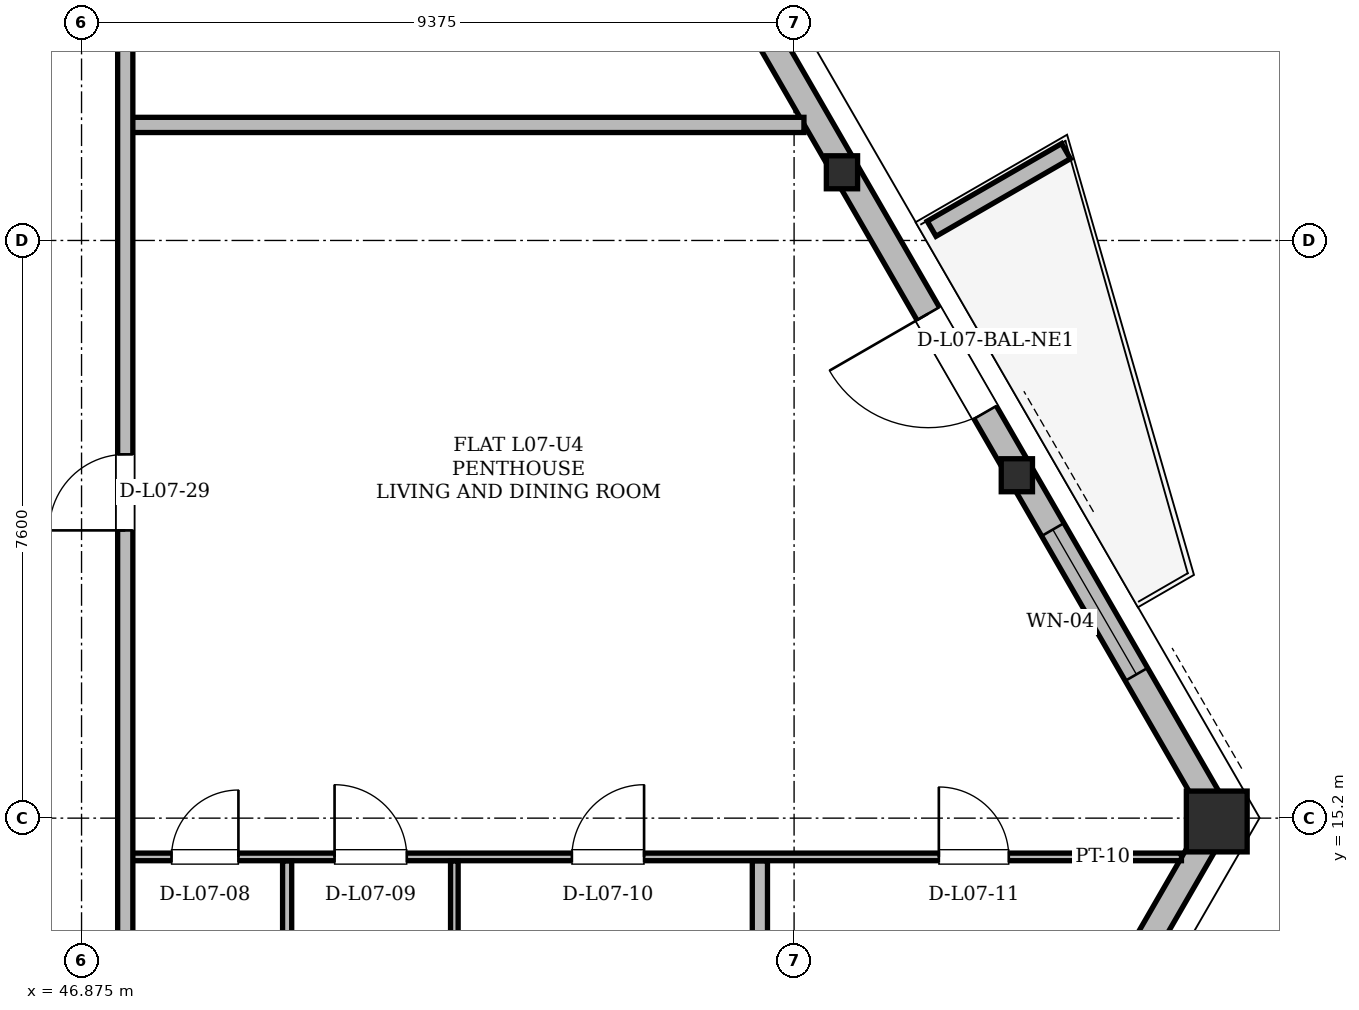
"""IFC4 building model, lengths in metres.
Left out: names, types, materials, properties, quantities, classifications, styles, units other than length and angle.
Written with IfcOpenShell. Run it as: python <this file> out.ifc"""

import sys

from ifc_helpers import new_model, si_unit, direction, frame, frame_2d, origin, origin_2d, place, context, subcontext, project, spatial, polyline, rectangle, hollow_rectangle, i_section, outline, extrude, element, fill, save


model = new_model("IFC4")
c1 = context("Model", 3, precision=1e-05, world=origin(), true_north=direction((0.0, 1.0)))
c2 = subcontext(c1, "Body", "Model", "MODEL_VIEW")
j1 = project(units=[si_unit("LENGTHUNIT", "METRE"), si_unit("PLANEANGLEUNIT", "RADIAN")], contexts=[c1])
p1 = place(None, origin())
s1 = spatial("IfcSite", under=j1, at=p1, CompositionType="ELEMENT")
p2 = place(p1, origin())
s2 = spatial("IfcBuilding", under=s1, at=p2, CompositionType="ELEMENT")
p3 = place(p2, frame((0.0, 0.0, 30.9)))
s3 = spatial("IfcBuildingStorey", under=s2, at=p3, CompositionType="ELEMENT", Elevation=30.9)
p4 = place(p3, frame((61.844, 15.204, 0.005), z_axis=(-0.018346571143, -0.026500602762, 0.999480425712), x_axis=(0.822192191644, -0.56920997883, 0.0)))
e1 = element("IfcColumn", 1, at=p4, inside=s3, PredefinedType="COLUMN", context=c2, shape_type="SweptSolid", body=[
    extrude(hollow_rectangle(XDim=0.8, YDim=0.8, WallThickness=0.065, at=origin_2d()), origin(), (0.0, 0.0, 1.0), 3.593),
])
p5 = place(p3, frame((59.218, 19.752, 0.005), z_axis=(-0.020522033279, -0.022696553361, 0.999531746677), x_axis=(0.741746192232, -0.670680688785, 0.0)))
e2 = element("IfcColumn", 2, at=p5, inside=s3, PredefinedType="COLUMN", context=c2, shape_type="SweptSolid", body=[
    extrude(i_section(OverallWidth=0.411, OverallDepth=0.434, WebThickness=0.036, FlangeThickness=0.057, at=origin_2d()), origin(), (0.0, 0.0, 1.0), 3.593),
])
p6 = place(p3, frame((56.92, 23.732, 0.005), z_axis=(-0.022425422026, -0.019299454107, 0.999562219933), x_axis=(0.652303294881, -0.757958053911, 0.0)))
e3 = element("IfcColumn", 3, at=p6, inside=s3, PredefinedType="COLUMN", context=c2, shape_type="SweptSolid", body=[
    extrude(i_section(OverallWidth=0.411, OverallDepth=0.434, WebThickness=0.036, FlangeThickness=0.057, at=origin_2d()), origin(), (0.0, 0.0, 1.0), 3.593),
])
p7 = place(p3, frame((53.912, 1.466, 0.0), z_axis=(0.0, 0.0, 1.0), x_axis=(0.500005775488, 0.866022069279, 0.0)))
e4 = element("IfcWall", 4, at=p7, inside=s3, PredefinedType="SOLIDWALL", context=c2, shape_type="SweptSolid", body=[
    extrude(rectangle(XDim=15.863, YDim=0.34, at=frame_2d((7.932, 0.0))), origin(), (0.0, 0.0, 1.0), 2.494),
])
p8 = place(p7, frame((11.276, 0.0, 0.85)))
e5 = element("IfcOpeningElement", 5, at=p8, cuts=e4, PredefinedType="OPENING", context=c2, shape_type="SweptSolid", body=[
    extrude(rectangle(XDim=1.2, YDim=1.48, at=frame_2d((0.6, 0.74))), frame((0.0, 0.17, 0.0), z_axis=(0.0, -1.0, 0.0), x_axis=(1.0, 0.0, 0.0)), (0.0, 0.0, 1.0), 0.34),
])
p9 = place(p3, frame((61.844, 15.204, 0.0), z_axis=(0.0, 0.0, 1.0), x_axis=(-0.500000372107, 0.866025188948, 0.0)))
e6 = element("IfcWall", 6, at=p9, inside=s3, PredefinedType="SOLIDWALL", context=c2, shape_type="SweptSolid", body=[
    extrude(rectangle(XDim=32.825, YDim=0.34, at=frame_2d((16.412, 0.0))), origin(), (0.0, 0.0, 1.0), 2.494),
])
p10 = place(p9, frame((6.159, 0.0, 0.0)))
e7 = element("IfcOpeningElement", 7, at=p10, cuts=e6, PredefinedType="OPENING", context=c2, shape_type="SweptSolid", body=[
    extrude(rectangle(XDim=1.5, YDim=2.2, at=frame_2d((0.75, 1.1))), frame((0.0, 0.17, 0.0), z_axis=(0.0, -1.0, 0.0), x_axis=(1.0, 0.0, 0.0)), (0.0, 0.0, 1.0), 0.34),
])
p11 = place(p9, frame((23.92, 0.0, 0.0)))
e8 = element("IfcOpeningElement", 8, at=p11, cuts=e6, PredefinedType="OPENING", context=c2, shape_type="SweptSolid", body=[
    extrude(rectangle(XDim=1.5, YDim=2.2, at=frame_2d((0.75, 1.1))), frame((0.0, 0.17, 0.0), z_axis=(0.0, -1.0, 0.0), x_axis=(1.0, 0.0, 0.0)), (0.0, 0.0, 1.0), 0.34),
])
p12 = place(p9, frame((2.18, 0.0, 0.85)))
e9 = element("IfcOpeningElement", 9, at=p12, cuts=e6, PredefinedType="OPENING", context=c2, shape_type="SweptSolid", body=[
    extrude(rectangle(XDim=2.2, YDim=1.534, at=frame_2d((1.1, 0.767))), frame((0.0, 0.17, 0.0), z_axis=(0.0, -1.0, 0.0), x_axis=(1.0, 0.0, 0.0)), (0.0, 0.0, 1.0), 0.34),
])
p13 = place(p9, frame((13.961, 0.0, 0.85)))
e10 = element("IfcOpeningElement", 10, at=p13, cuts=e6, PredefinedType="OPENING", context=c2, shape_type="SweptSolid", body=[
    extrude(rectangle(XDim=2.0, YDim=1.534, at=frame_2d((1.0, 0.767))), frame((0.0, 0.17, 0.0), z_axis=(0.0, -1.0, 0.0), x_axis=(1.0, 0.0, 0.0)), (0.0, 0.0, 1.0), 0.34),
])
p14 = place(p9, frame((28.489, 0.0, 0.85)))
e11 = element("IfcOpeningElement", 11, at=p14, cuts=e6, PredefinedType="OPENING", context=c2, shape_type="SweptSolid", body=[
    extrude(rectangle(XDim=1.4, YDim=1.534, at=frame_2d((0.7, 0.767))), frame((0.0, 0.17, 0.0), z_axis=(0.0, -1.0, 0.0), x_axis=(1.0, 0.0, 0.0)), (0.0, 0.0, 1.0), 0.34),
])
p15 = place(p3, frame((58.06, 22.954, 0.0), z_axis=(0.0, 0.0, 1.0), x_axis=(0.866012356593, 0.500022597718, 0.0)))
e12 = element("IfcWall", 12, at=p15, inside=s3, PredefinedType="PARAPET", context=c2, shape_type="SweptSolid", body=[
    extrude(outline(polyline([(0.0, 0.0), (2.042, 0.0), (2.042, 1.1), (0.0, 1.32), (0.0, 0.0)])), frame((0.0, 0.115, 0.0), z_axis=(0.0, -1.0, 0.0), x_axis=(1.0, 0.0, 0.0)), (0.0, 0.0, 1.0), 0.23),
])
p16 = place(p3, frame((47.4, 14.69, 0.0), z_axis=(0.0, 0.0, 1.0), x_axis=(1.0, 0.0, 0.0)))
e13 = element("IfcWall", 13, at=p16, inside=s3, PredefinedType="PARTITIONING", context=c2, shape_type="SweptSolid", body=[
    extrude(rectangle(XDim=13.947, YDim=0.1, at=frame_2d((6.973, 0.0))), origin(), (0.0, 0.0, 1.0), 2.738),
])
p17 = place(p16, frame((0.659, 0.0, 0.0)))
e14 = element("IfcOpeningElement", 14, at=p17, cuts=e13, PredefinedType="OPENING", context=c2, shape_type="SweptSolid", body=[
    extrude(rectangle(XDim=0.88, YDim=2.08, at=frame_2d((0.44, 1.04))), frame((0.0, 0.05, 0.0), z_axis=(0.0, -1.0, 0.0), x_axis=(1.0, 0.0, 0.0)), (0.0, 0.0, 1.0), 0.1),
])
p18 = place(p16, frame((2.804, 0.0, 0.0)))
e15 = element("IfcOpeningElement", 15, at=p18, cuts=e13, PredefinedType="OPENING", context=c2, shape_type="SweptSolid", body=[
    extrude(rectangle(XDim=0.95, YDim=2.1, at=frame_2d((0.475, 1.05))), frame((0.0, 0.05, 0.0), z_axis=(0.0, -1.0, 0.0), x_axis=(1.0, 0.0, 0.0)), (0.0, 0.0, 1.0), 0.1),
])
p19 = place(p16, frame((5.926, 0.0, 0.0)))
e16 = element("IfcOpeningElement", 16, at=p19, cuts=e13, PredefinedType="OPENING", context=c2, shape_type="SweptSolid", body=[
    extrude(rectangle(XDim=0.95, YDim=2.1, at=frame_2d((0.475, 1.05))), frame((0.0, 0.05, 0.0), z_axis=(0.0, -1.0, 0.0), x_axis=(1.0, 0.0, 0.0)), (0.0, 0.0, 1.0), 0.1),
])
p20 = place(p16, frame((10.754, 0.0, 0.0)))
e17 = element("IfcOpeningElement", 17, at=p20, cuts=e13, PredefinedType="OPENING", context=c2, shape_type="SweptSolid", body=[
    extrude(rectangle(XDim=0.92, YDim=2.12, at=frame_2d((0.46, 1.06))), frame((0.0, 0.05, 0.0), z_axis=(0.0, -1.0, 0.0), x_axis=(1.0, 0.0, 0.0)), (0.0, 0.0, 1.0), 0.1),
])
p21 = place(p3, frame((47.45, 24.32, 0.0), z_axis=(0.0, 0.0, 1.0), x_axis=(1.0, 0.0, 0.0)))
e18 = element("IfcWall", 18, at=p21, inside=s3, PredefinedType="PARTITIONING", context=c2, shape_type="SweptSolid", body=[
    extrude(rectangle(XDim=8.93, YDim=0.2, at=frame_2d((4.465, 0.0))), origin(), (0.0, 0.0, 1.0), 2.494),
])
p22 = place(p3, frame((47.45, 11.054, 0.0), z_axis=(0.0, 0.0, 1.0), x_axis=(0.0, 1.0, 0.0)))
e19 = element("IfcWall", 19, at=p22, inside=s3, PredefinedType="PARTITIONING", context=c2, shape_type="SweptSolid", body=[
    extrude(rectangle(XDim=14.812, YDim=0.2, at=frame_2d((7.406, 0.0))), origin(), (0.0, 0.0, 1.0), 2.738),
])
p23 = place(p22, frame((7.932, 0.0, 0.0)))
e20 = element("IfcOpeningElement", 20, at=p23, cuts=e19, PredefinedType="OPENING", context=c2, shape_type="SweptSolid", body=[
    extrude(rectangle(XDim=1.0, YDim=2.18, at=frame_2d((0.5, 1.09))), frame((0.0, 0.1, 0.0), z_axis=(0.0, -1.0, 0.0), x_axis=(1.0, 0.0, 0.0)), (0.0, 0.0, 1.0), 0.2),
])
p24 = place(p3, frame((49.58, 11.054, 0.0), z_axis=(0.0, 0.0, 1.0), x_axis=(0.0, 1.0, 0.0)))
e21 = element("IfcWall", 21, at=p24, inside=s3, PredefinedType="PARTITIONING", context=c2, shape_type="SweptSolid", body=[
    extrude(rectangle(XDim=3.582, YDim=0.12, at=frame_2d((1.791, 0.0))), origin(), (0.0, 0.0, 1.0), 2.738),
])
p25 = place(p3, frame((51.78, 11.054, 0.0), z_axis=(0.0, 0.0, 1.0), x_axis=(0.0, 1.0, 0.0)))
e22 = element("IfcWall", 22, at=p25, inside=s3, PredefinedType="PARTITIONING", context=c2, shape_type="SweptSolid", body=[
    extrude(rectangle(XDim=3.582, YDim=0.1, at=frame_2d((1.791, 0.0))), origin(), (0.0, 0.0, 1.0), 2.738),
])
p26 = place(p3, frame((55.8, 9.404, 0.0), z_axis=(0.0, 0.0, 1.0), x_axis=(0.0, 1.0, 0.0)))
e23 = element("IfcWall", 23, at=p26, inside=s3, PredefinedType="PARTITIONING", context=c2, shape_type="SweptSolid", body=[
    extrude(rectangle(XDim=5.232, YDim=0.2, at=frame_2d((2.616, 0.0))), origin(), (0.0, 0.0, 1.0), 2.738),
])
p27 = place(p10, origin())
e24 = element("IfcDoor", 24, at=p27, inside=s3, OperationType="SINGLE_SWING_RIGHT", PredefinedType="DOOR", context=c2, shape_type="SweptSolid", body=[
    extrude(rectangle(XDim=1.5, YDim=2.2, at=frame_2d((0.75, 1.1))), frame((0.0, 0.025, 0.0), z_axis=(0.0, -1.0, 0.0), x_axis=(1.0, 0.0, 0.0)), (0.0, 0.0, 1.0), 0.05),
])
fill(e7, e24)
p28 = place(p12, origin())
e25 = element("IfcWindow", 25, at=p28, inside=s3, PartitioningType="SINGLE_PANEL", PredefinedType="WINDOW", context=c2, shape_type="SweptSolid", body=[
    extrude(rectangle(XDim=2.2, YDim=1.534, at=frame_2d((1.1, 0.767))), frame((0.0, 0.03, 0.0), z_axis=(0.0, -1.0, 0.0), x_axis=(1.0, 0.0, 0.0)), (0.0, 0.0, 1.0), 0.06),
])
fill(e9, e25)
p29 = place(p17, origin())
e26 = element("IfcDoor", 26, at=p29, inside=s3, OperationType="SINGLE_SWING_RIGHT", PredefinedType="DOOR", context=c2, shape_type="SweptSolid", body=[
    extrude(rectangle(XDim=0.88, YDim=2.08, at=frame_2d((0.44, 1.04))), frame((0.0, 0.025, 0.0), z_axis=(0.0, -1.0, 0.0), x_axis=(1.0, 0.0, 0.0)), (0.0, 0.0, 1.0), 0.05),
])
fill(e14, e26)
p30 = place(p18, origin())
e27 = element("IfcDoor", 27, at=p30, inside=s3, OperationType="SINGLE_SWING_LEFT", PredefinedType="DOOR", context=c2, shape_type="SweptSolid", body=[
    extrude(rectangle(XDim=0.95, YDim=2.1, at=frame_2d((0.475, 1.05))), frame((0.0, 0.025, 0.0), z_axis=(0.0, -1.0, 0.0), x_axis=(1.0, 0.0, 0.0)), (0.0, 0.0, 1.0), 0.05),
])
fill(e15, e27)
p31 = place(p19, origin())
e28 = element("IfcDoor", 28, at=p31, inside=s3, OperationType="SINGLE_SWING_RIGHT", PredefinedType="DOOR", context=c2, shape_type="SweptSolid", body=[
    extrude(rectangle(XDim=0.95, YDim=2.1, at=frame_2d((0.475, 1.05))), frame((0.0, 0.025, 0.0), z_axis=(0.0, -1.0, 0.0), x_axis=(1.0, 0.0, 0.0)), (0.0, 0.0, 1.0), 0.05),
])
fill(e16, e28)
p32 = place(p20, origin())
e29 = element("IfcDoor", 29, at=p32, inside=s3, OperationType="SINGLE_SWING_LEFT", PredefinedType="DOOR", context=c2, shape_type="SweptSolid", body=[
    extrude(rectangle(XDim=0.92, YDim=2.12, at=frame_2d((0.46, 1.06))), frame((0.0, 0.025, 0.0), z_axis=(0.0, -1.0, 0.0), x_axis=(1.0, 0.0, 0.0)), (0.0, 0.0, 1.0), 0.05),
])
fill(e17, e29)
p33 = place(p23, origin())
e30 = element("IfcDoor", 30, at=p33, inside=s3, OperationType="SINGLE_SWING_LEFT", PredefinedType="DOOR", context=c2, shape_type="SweptSolid", body=[
    extrude(rectangle(XDim=1.0, YDim=2.18, at=frame_2d((0.5, 1.09))), frame((0.0, 0.025, 0.0), z_axis=(0.0, -1.0, 0.0), x_axis=(1.0, 0.0, 0.0)), (0.0, 0.0, 1.0), 0.05),
])
fill(e20, e30)
save(model, sys.argv[1])
